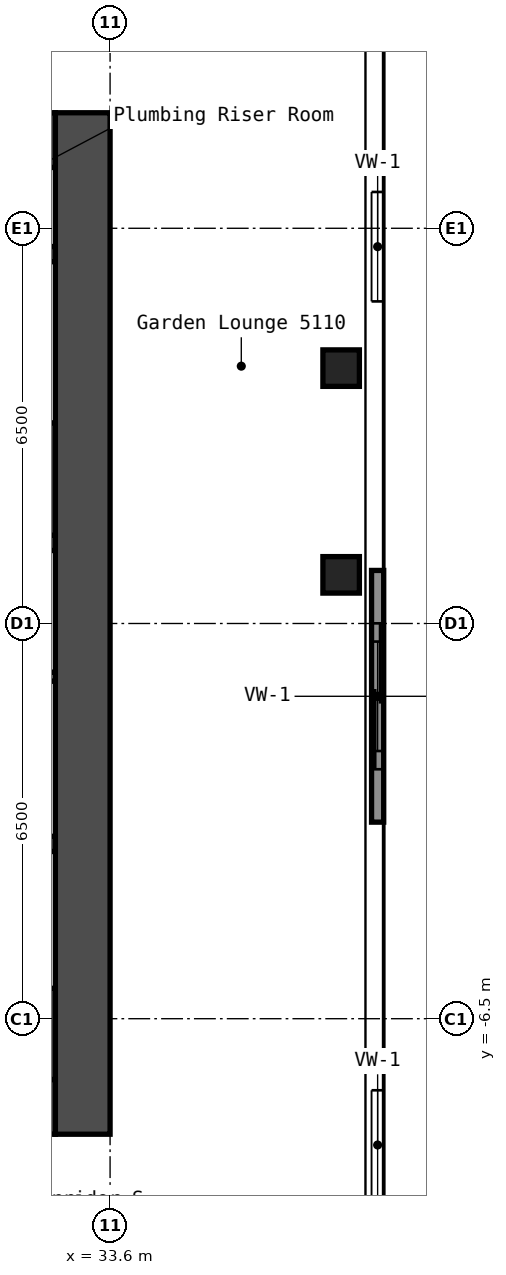
"""IFC4 building model, lengths in metres.
Left out: names, types, materials, properties, quantities, classifications, styles, units other than length and angle.
Written with IfcOpenShell. Run it as: python <this file> out.ifc"""

import sys

from ifc_helpers import new_model, si_unit, direction, frame, frame_2d, origin, origin_2d, place, context, subcontext, project, spatial, rectangle, hollow_rectangle, extrude, element, save


model = new_model("IFC4")
c1 = context("Model", 3, precision=1e-05, world=origin(), true_north=direction((0.0, 1.0)))
c2 = subcontext(c1, "Body", "Model", "MODEL_VIEW")
j1 = project(units=[si_unit("LENGTHUNIT", "METRE"), si_unit("PLANEANGLEUNIT", "RADIAN")], contexts=[c1])
p1 = place(None, origin())
s1 = spatial("IfcSite", under=j1, at=p1, CompositionType="ELEMENT")
p2 = place(p1, origin())
s2 = spatial("IfcBuilding", under=s1, at=p2, CompositionType="ELEMENT")
p3 = place(p2, frame((0.0, 0.0, 180.2)))
s3 = spatial("IfcBuildingStorey", under=s2, at=p3, CompositionType="ELEMENT", Elevation=180.2)
for number, where, z_axis, x_axis in (
    (1, (37.4, 0.8, 0.0), (0.0, 0.0, 1.0), (1.0, 0.0, 0.0)),
    (2, (37.4, 4.2, 0.0), (0.0, 0.0, 1.0), (1.0, 0.0, 0.0)),
):
    element("IfcColumn", number, at=place(p3, frame(where, z_axis=z_axis, x_axis=x_axis)), inside=s3, PredefinedType="COLUMN", context=c2, shape_type="SweptSolid", body=[
        extrude(hollow_rectangle(XDim=0.6, YDim=0.6, WallThickness=0.025, InnerFilletRadius=0.038, OuterFilletRadius=0.062, at=origin_2d()), origin(), (0.0, 0.0, 1.0), 5.95),
    ])
p4 = place(p3, frame((33.15, -8.4, 0.0), z_axis=(0.0, 0.0, 1.0), x_axis=(0.0, 1.0, 0.0)))
e3 = element("IfcWall", 3, at=p4, inside=s3, PredefinedType="SHEAR", context=c2, shape_type="SweptSolid", body=[
    extrude(rectangle(XDim=16.8, YDim=0.9, at=frame_2d((8.4, 0.0))), origin(), (0.0, 0.0, 1.0), 5.95),
])
p5 = place(p3, frame((17.7, 7.95, 0.0), z_axis=(0.0, 0.0, 1.0), x_axis=(1.0, 0.0, 0.0)))
e4 = element("IfcWall", 4, at=p5, inside=s3, PredefinedType="SHEAR", context=c2, shape_type="SweptSolid", body=[
    extrude(rectangle(XDim=15.0, YDim=0.9, at=frame_2d((7.5, 0.0))), origin(), (0.0, 0.0, 1.0), 5.95),
])
p6 = place(p5, frame((10.4, 0.0, 0.0)))
e5 = element("IfcOpeningElement", 5, at=p6, cuts=e4, PredefinedType="OPENING", context=c2, shape_type="SweptSolid", body=[
    extrude(rectangle(XDim=1.2, YDim=2.1, at=frame_2d((0.6, 1.05))), frame((0.0, 0.46, 0.0), z_axis=(0.0, -1.0, 0.0), x_axis=(1.0, 0.0, 0.0)), (0.0, 0.0, 1.0), 0.92),
])
p7 = place(p5, frame((13.35, 0.0, 0.0)))
e6 = element("IfcOpeningElement", 6, at=p7, cuts=e4, PredefinedType="OPENING", context=c2, shape_type="SweptSolid", body=[
    extrude(rectangle(XDim=0.9, YDim=2.1, at=frame_2d((0.45, 1.05))), frame((0.0, 0.46, 0.0), z_axis=(0.0, -1.0, 0.0), x_axis=(1.0, 0.0, 0.0)), (0.0, 0.0, 1.0), 0.92),
])
p8 = place(p3, frame((17.7, -7.95, 0.0), z_axis=(0.0, 0.0, 1.0), x_axis=(1.0, 0.0, 0.0)))
e7 = element("IfcWall", 7, at=p8, inside=s3, PredefinedType="SHEAR", context=c2, shape_type="SweptSolid", body=[
    extrude(rectangle(XDim=15.0, YDim=0.9, at=frame_2d((7.5, 0.0))), origin(), (0.0, 0.0, 1.0), 5.95),
])
p9 = place(p8, frame((2.55, 0.0, 0.0)))
e8 = element("IfcOpeningElement", 8, at=p9, cuts=e7, PredefinedType="OPENING", context=c2, shape_type="SweptSolid", body=[
    extrude(rectangle(XDim=1.0, YDim=2.1, at=frame_2d((0.5, 1.05))), frame((0.0, 0.46, 0.0), z_axis=(0.0, -1.0, 0.0), x_axis=(1.0, 0.0, 0.0)), (0.0, 0.0, 1.0), 0.92),
])
p10 = place(p3, frame((27.65, 1.325, 0.0), z_axis=(0.0, 0.0, 1.0), x_axis=(1.0, 0.0, 0.0)))
e9 = element("IfcWall", 9, at=p10, inside=s3, PredefinedType="SHEAR", context=c2, shape_type="SweptSolid", body=[
    extrude(rectangle(XDim=5.05, YDim=0.25, at=frame_2d((2.525, 0.0))), origin(), (0.0, 0.0, 1.0), 5.95),
])
p11 = place(p10, frame((0.55, 0.0, 0.0)))
e10 = element("IfcOpeningElement", 10, at=p11, cuts=e9, PredefinedType="OPENING", context=c2, shape_type="SweptSolid", body=[
    extrude(rectangle(XDim=1.2, YDim=2.1, at=frame_2d((0.6, 1.05))), frame((0.0, 0.135, 0.0), z_axis=(0.0, -1.0, 0.0), x_axis=(1.0, 0.0, 0.0)), (0.0, 0.0, 1.0), 0.27),
])
p12 = place(p3, frame((30.3, 2.375, 0.0), z_axis=(0.0, 0.0, 1.0), x_axis=(1.0, 0.0, 0.0)))
e11 = element("IfcWall", 11, at=p12, inside=s3, PredefinedType="SHEAR", context=c2, shape_type="SweptSolid", body=[
    extrude(rectangle(XDim=2.4, YDim=1.85, at=frame_2d((1.2, 0.0))), origin(), (0.0, 0.0, 1.0), 5.95),
])
p13 = place(p3, frame((30.3, 6.075, 0.0), z_axis=(0.0, 0.0, 1.0), x_axis=(1.0, 0.0, 0.0)))
e12 = element("IfcWall", 12, at=p13, inside=s3, PredefinedType="SHEAR", context=c2, shape_type="SweptSolid", body=[
    extrude(rectangle(XDim=2.4, YDim=0.25, at=frame_2d((1.2, 0.0))), origin(), (0.0, 0.0, 1.0), 5.95),
])
p14 = place(p3, frame((28.15, -3.625, 0.0), z_axis=(0.0, 0.0, 1.0), x_axis=(1.0, 0.0, 0.0)))
e13 = element("IfcWall", 13, at=p14, inside=s3, PredefinedType="SHEAR", context=c2, shape_type="SweptSolid", body=[
    extrude(rectangle(XDim=4.55, YDim=0.25, at=frame_2d((2.275, 0.0))), origin(), (0.0, 0.0, 1.0), 5.95),
])
p15 = place(p3, frame((28.15, -6.75, 0.0), z_axis=(0.0, 0.0, 1.0), x_axis=(1.0, 0.0, 0.0)))
e14 = element("IfcWall", 14, at=p15, inside=s3, PredefinedType="SHEAR", context=c2, shape_type="SweptSolid", body=[
    extrude(rectangle(XDim=4.55, YDim=1.5, at=frame_2d((2.275, 0.0))), origin(), (0.0, 0.0, 1.0), 5.95),
])
p16 = place(p3, frame((30.4, -0.875, 0.0), z_axis=(0.0, 0.0, 1.0), x_axis=(1.0, 0.0, 0.0)))
e15 = element("IfcWall", 15, at=p16, inside=s3, PredefinedType="PARTITIONING", context=c2, shape_type="SweptSolid", body=[
    extrude(rectangle(XDim=2.3, YDim=0.15, at=frame_2d((1.15, 0.0))), origin(), (0.0, 0.0, 1.0), 5.95),
])
p17 = place(p3, frame((38.0, -12.26, 4.45), z_axis=(0.0, 0.0, 1.0), x_axis=(0.0, 1.0, 0.0)))
p18 = place(p17, frame((2.782, 0.0, 0.25)))
p19 = place(p18, origin())
e16 = element("IfcWindow", 16, at=p19, inside=s3, PartitioningType="SINGLE_PANEL", PredefinedType="WINDOW", context=c2, shape_type="SweptSolid", body=[
    extrude(rectangle(XDim=1.8, YDim=0.9, at=frame_2d((0.9, 0.45))), frame((0.0, 0.03, 0.0), z_axis=(0.0, -1.0, 0.0), x_axis=(1.0, 0.0, 0.0)), (0.0, 0.0, 1.0), 0.06),
])
p20 = place(p3, frame((38.0, -4.895, 4.45), z_axis=(0.0, 0.0, 1.0), x_axis=(0.0, 1.0, 0.0)))
p21 = place(p20, frame((2.797, 0.0, 0.25)))
p22 = place(p21, origin())
e17 = element("IfcWindow", 17, at=p22, inside=s3, PartitioningType="SINGLE_PANEL", PredefinedType="WINDOW", context=c2, shape_type="SweptSolid", body=[
    extrude(rectangle(XDim=1.8, YDim=0.9, at=frame_2d((0.9, 0.45))), frame((0.0, 0.03, 0.0), z_axis=(0.0, -1.0, 0.0), x_axis=(1.0, 0.0, 0.0)), (0.0, 0.0, 1.0), 0.06),
])
p23 = place(p3, frame((38.0, 2.5, 4.45), z_axis=(0.0, 0.0, 1.0), x_axis=(0.0, 1.0, 0.0)))
p24 = place(p23, frame((2.797, 0.0, 0.25)))
p25 = place(p24, origin())
e18 = element("IfcWindow", 18, at=p25, inside=s3, PartitioningType="SINGLE_PANEL", PredefinedType="WINDOW", context=c2, shape_type="SweptSolid", body=[
    extrude(rectangle(XDim=1.8, YDim=0.9, at=frame_2d((0.9, 0.45))), frame((0.0, 0.03, 0.0), z_axis=(0.0, -1.0, 0.0), x_axis=(1.0, 0.0, 0.0)), (0.0, 0.0, 1.0), 0.06),
])
p26 = place(p3, frame((38.0, -3.267, 0.0), z_axis=(0.0, 0.0, 1.0), x_axis=(0.0, 1.0, 0.0)))
p27 = place(p26, frame((0.87, 0.0, 0.0)))
p28 = place(p27, frame((2.4, 0.0, 0.0), z_axis=(0.0, 0.0, 1.0), x_axis=(-1.0, 0.0, 0.0)))
e19 = element("IfcDoor", 19, at=p28, inside=s3, OperationType="SLIDING_TO_LEFT", PredefinedType="DOOR", context=c2, shape_type="SweptSolid", body=[
    extrude(rectangle(XDim=2.4, YDim=2.2, at=frame_2d((1.2, 1.1))), frame((0.0, 0.025, 0.0), z_axis=(0.0, -1.0, 0.0), x_axis=(1.0, 0.0, 0.0)), (0.0, 0.0, 1.0), 0.05),
])
save(model, sys.argv[1])
